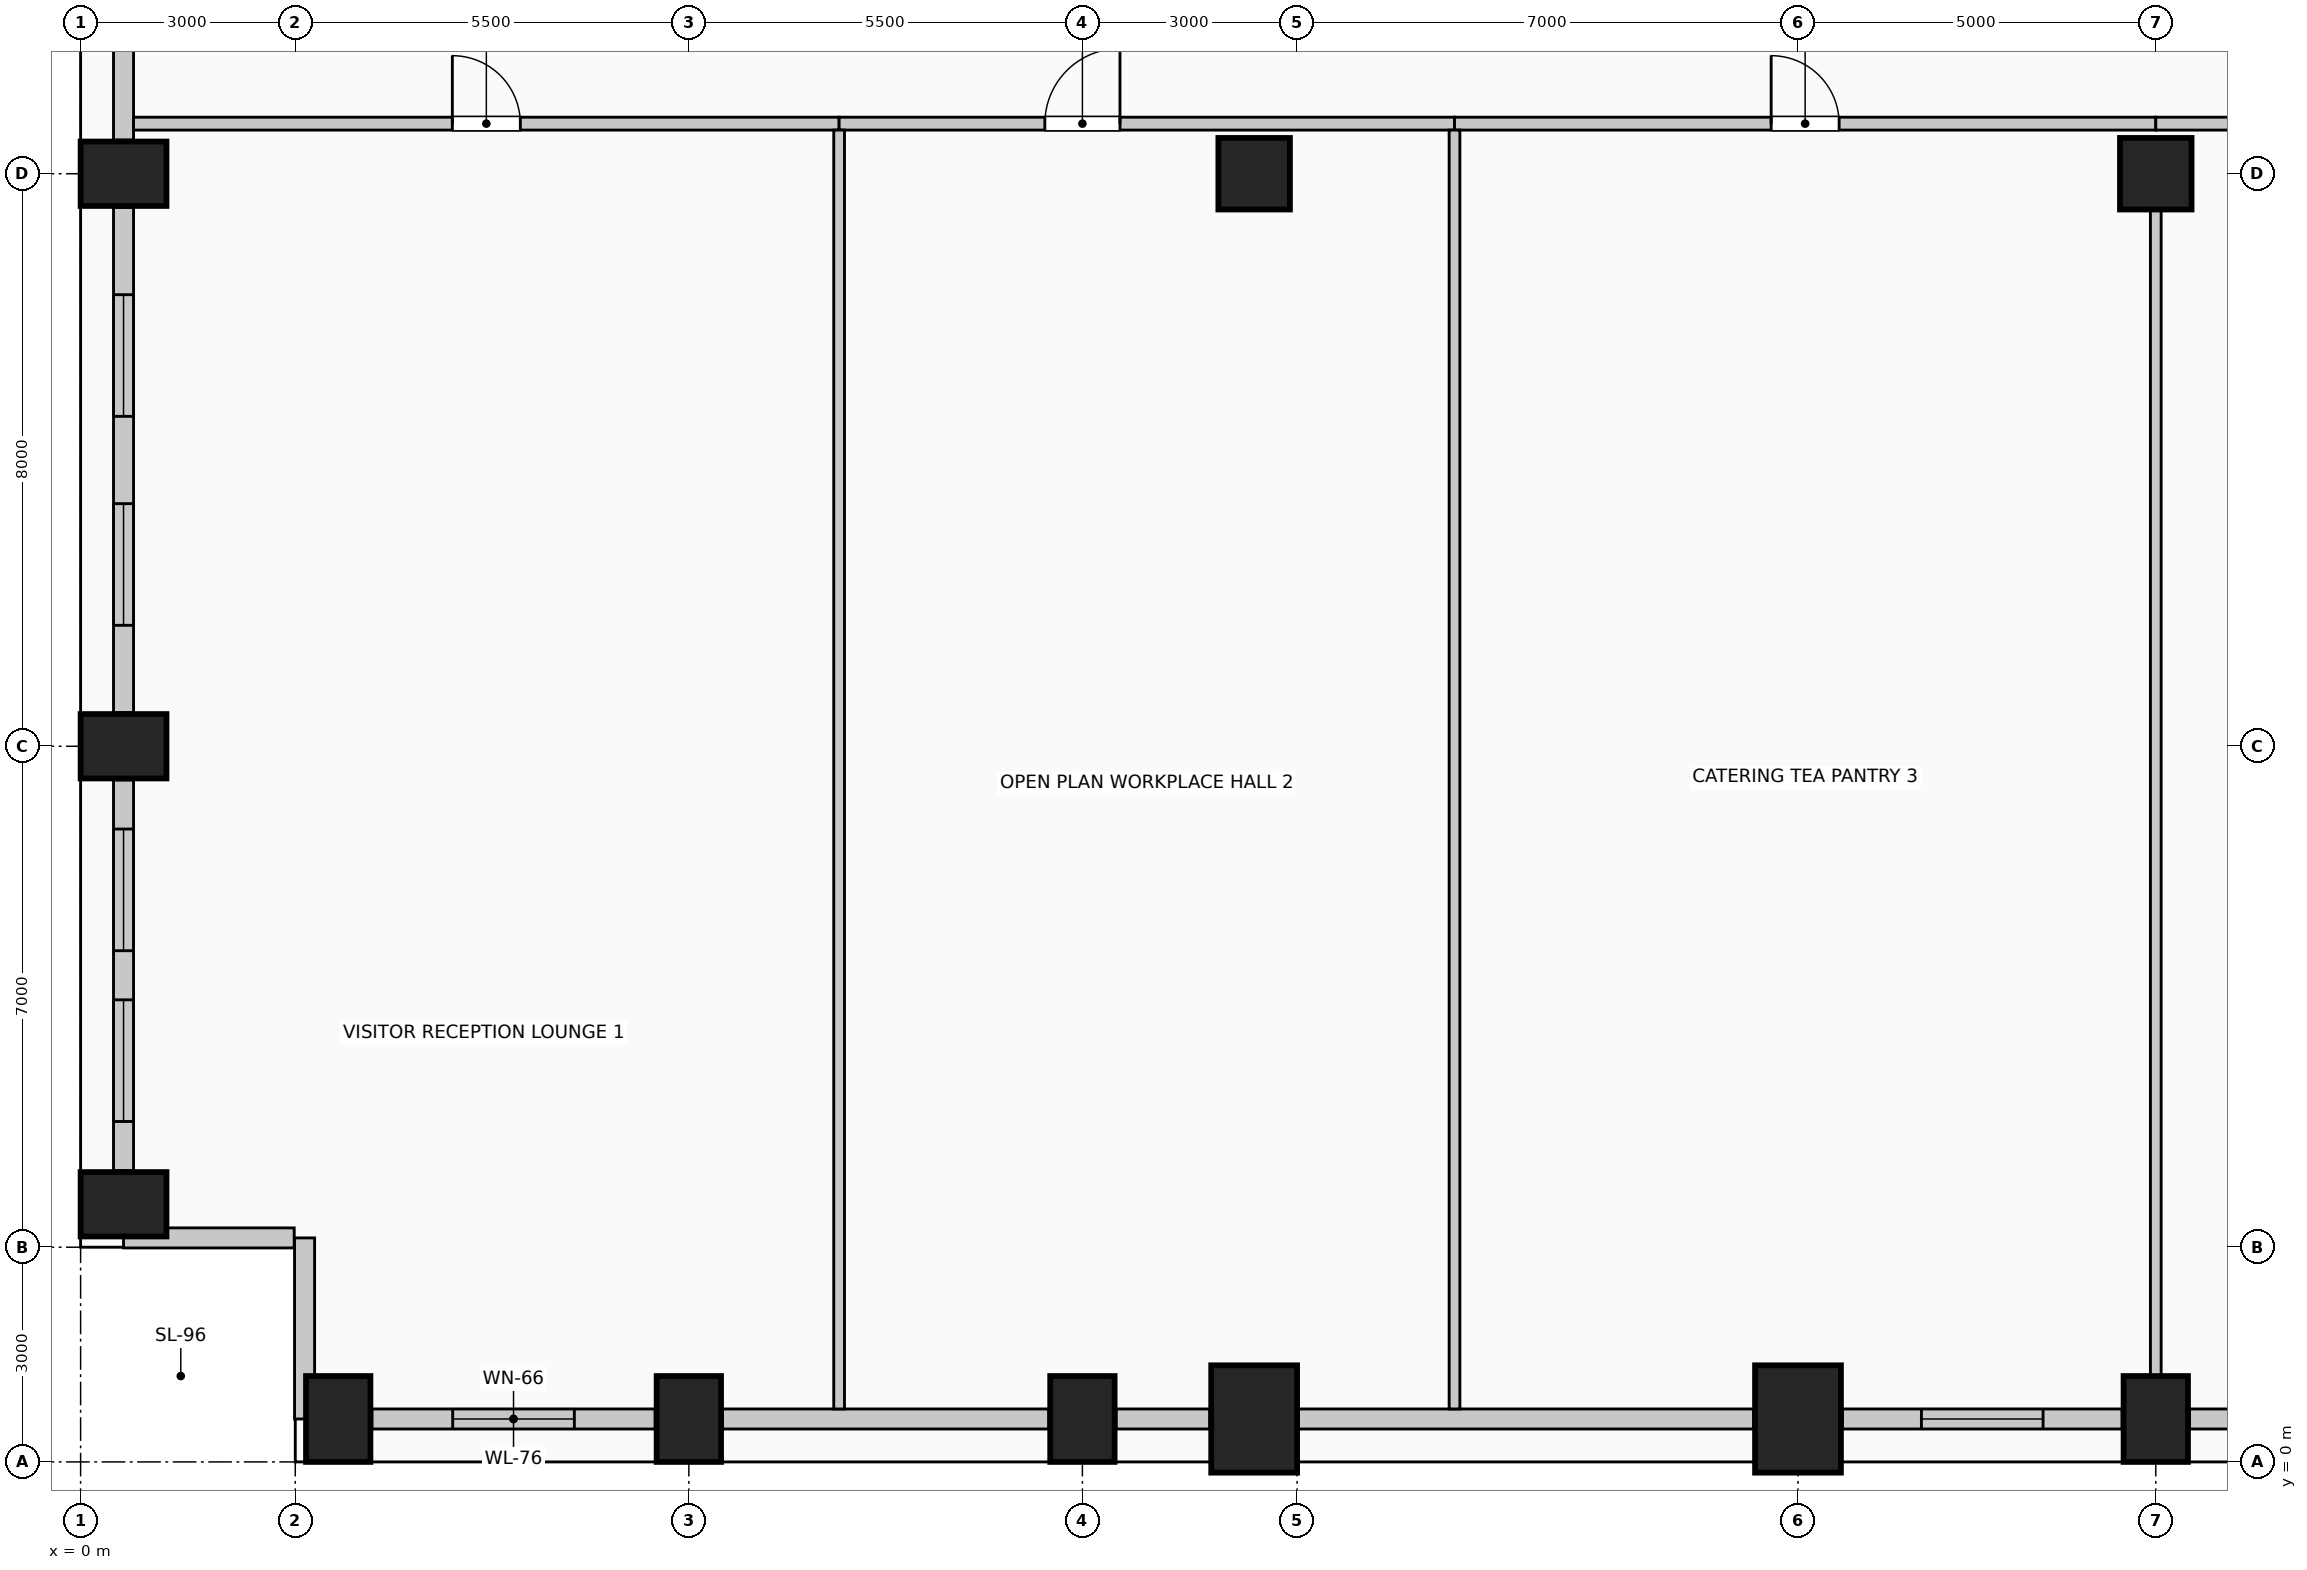
"""IFC4 building model, lengths in metres.
Left out: names, types, materials, properties, quantities, classifications, styles, units other than length and angle.
Written with IfcOpenShell. Run it as: python <this file> out.ifc"""

import sys

from ifc_helpers import new_model, si_unit, direction, frame, frame_2d, origin, origin_2d, place, context, subcontext, project, spatial, rectangle, circle, extrude, element, fill, save


model = new_model("IFC4")
c1 = context("Model", 3, precision=1e-05, world=origin(), true_north=direction((0.0, 1.0)))
c2 = subcontext(c1, "Body", "Model", "MODEL_VIEW")
j1 = project(units=[si_unit("LENGTHUNIT", "METRE"), si_unit("PLANEANGLEUNIT", "RADIAN")], contexts=[c1])
p1 = place(None, origin())
s1 = spatial("IfcSite", under=j1, at=p1, CompositionType="ELEMENT")
p2 = place(p1, origin())
s2 = spatial("IfcBuilding", under=s1, at=p2, CompositionType="ELEMENT")
p3 = place(p2, frame((0.0, 0.0, 78.6)))
s3 = spatial("IfcBuildingStorey", under=s2, at=p3, CompositionType="ELEMENT", Elevation=78.6)
for number, where, z_axis, x_axis in (
    (1, (3.6, 0.6, 0.0), (0.0, 0.0, 1.0), (1.0, 0.0, 0.0)),
    (2, (8.5, 0.6, 0.0), (0.0, 0.0, 1.0), (1.0, 0.0, 0.0)),
    (3, (14.0, 0.6, 0.0), (0.0, 0.0, 1.0), (1.0, 0.0, 0.0)),
):
    element("IfcColumn", number, at=place(p3, frame(where, z_axis=z_axis, x_axis=x_axis)), inside=s3, PredefinedType="COLUMN", context=c2, shape_type="SweptSolid", body=[
        extrude(rectangle(XDim=0.9, YDim=1.2, at=origin_2d()), origin(), (0.0, 0.0, 1.0), 4.0),
    ])
for number, where, z_axis, x_axis in (
    (4, (16.4, 0.6, 0.0), (0.0, 0.0, 1.0), (1.0, 0.0, 0.0)),
    (5, (24.0, 0.6, 0.0), (0.0, 0.0, 1.0), (1.0, 0.0, 0.0)),
):
    element("IfcColumn", number, at=place(p3, frame(where, z_axis=z_axis, x_axis=x_axis)), inside=s3, PredefinedType="COLUMN", context=c2, shape_type="SweptSolid", body=[
        extrude(rectangle(XDim=1.2, YDim=1.5, at=origin_2d()), origin(), (0.0, 0.0, 1.0), 4.0),
    ])
for number, where, z_axis, x_axis in (
    (6, (29.0, 0.6, 0.0), (0.0, 0.0, 1.0), (1.0, 0.0, 0.0)),
    (7, (0.6, 3.6, 0.0), (0.0, 0.0, 1.0), (0.0, 1.0, 0.0)),
    (8, (0.6, 10.0, 0.0), (0.0, 0.0, 1.0), (0.0, 1.0, 0.0)),
    (9, (0.6, 18.0, 0.0), (0.0, 0.0, 1.0), (0.0, 1.0, 0.0)),
):
    element("IfcColumn", number, at=place(p3, frame(where, z_axis=z_axis, x_axis=x_axis)), inside=s3, PredefinedType="COLUMN", context=c2, shape_type="SweptSolid", body=[
        extrude(rectangle(XDim=0.9, YDim=1.2, at=origin_2d()), origin(), (0.0, 0.0, 1.0), 4.0),
    ])
for number, where, z_axis, x_axis in (
    (10, (16.4, 18.0, 0.0), (0.0, 0.0, 1.0), (1.0, 0.0, 0.0)),
    (11, (29.0, 18.0, 0.0), (0.0, 0.0, 1.0), (1.0, 0.0, 0.0)),
):
    element("IfcColumn", number, at=place(p3, frame(where, z_axis=z_axis, x_axis=x_axis)), inside=s3, PredefinedType="COLUMN", context=c2, shape_type="SweptSolid", body=[
        extrude(circle(Radius=0.5, at=origin_2d()), origin(), (0.0, 0.0, 1.0), 4.0),
    ])
p4 = place(p3, frame((8.03, 0.6, 0.0), z_axis=(0.0, 0.0, 1.0), x_axis=(-1.0, 0.0, 0.0)))
e12 = element("IfcWall", 12, at=p4, inside=s3, PredefinedType="SOLIDWALL", context=c2, shape_type="SweptSolid", body=[
    extrude(rectangle(XDim=3.96, YDim=0.28, at=frame_2d((1.98, 0.0))), origin(), (0.0, 0.0, 1.0), 2.81),
])
p5 = place(p4, frame((1.13, 0.0, 0.5)))
e13 = element("IfcOpeningElement", 13, at=p5, cuts=e12, PredefinedType="OPENING", context=c2, shape_type="SweptSolid", body=[
    extrude(rectangle(XDim=1.7, YDim=1.95, at=frame_2d((0.85, 0.975))), frame((0.0, 0.15, 0.0), z_axis=(0.0, -1.0, 0.0), x_axis=(1.0, 0.0, 0.0)), (0.0, 0.0, 1.0), 0.3),
])
p6 = place(p3, frame((13.53, 0.6, 0.0), z_axis=(0.0, 0.0, 1.0), x_axis=(-1.0, 0.0, 0.0)))
e14 = element("IfcWall", 14, at=p6, inside=s3, PredefinedType="SOLIDWALL", context=c2, shape_type="SweptSolid", body=[
    extrude(rectangle(XDim=4.56, YDim=0.28, at=frame_2d((2.28, 0.0))), origin(), (0.0, 0.0, 1.0), 2.81),
])
p7 = place(p3, frame((15.78, 0.6, 0.0), z_axis=(0.0, 0.0, 1.0), x_axis=(-1.0, 0.0, 0.0)))
e15 = element("IfcWall", 15, at=p7, inside=s3, PredefinedType="SOLIDWALL", context=c2, shape_type="SweptSolid", body=[
    extrude(rectangle(XDim=1.31, YDim=0.28, at=frame_2d((0.655, 0.0))), origin(), (0.0, 0.0, 1.0), 2.81),
])
p8 = place(p3, frame((23.38, 0.6, 0.0), z_axis=(0.0, 0.0, 1.0), x_axis=(-1.0, 0.0, 0.0)))
e16 = element("IfcWall", 16, at=p8, inside=s3, PredefinedType="SOLIDWALL", context=c2, shape_type="SweptSolid", body=[
    extrude(rectangle(XDim=6.36, YDim=0.28, at=frame_2d((3.18, 0.0))), origin(), (0.0, 0.0, 1.0), 2.81),
])
p9 = place(p3, frame((28.53, 0.6, 0.0), z_axis=(0.0, 0.0, 1.0), x_axis=(-1.0, 0.0, 0.0)))
e17 = element("IfcWall", 17, at=p9, inside=s3, PredefinedType="SOLIDWALL", context=c2, shape_type="SweptSolid", body=[
    extrude(rectangle(XDim=3.91, YDim=0.28, at=frame_2d((1.955, 0.0))), origin(), (0.0, 0.0, 1.0), 2.81),
])
p10 = place(p9, frame((1.105, 0.0, 0.5)))
e18 = element("IfcOpeningElement", 18, at=p10, cuts=e17, PredefinedType="OPENING", context=c2, shape_type="SweptSolid", body=[
    extrude(rectangle(XDim=1.7, YDim=1.95, at=frame_2d((0.85, 0.975))), frame((0.0, 0.15, 0.0), z_axis=(0.0, -1.0, 0.0), x_axis=(1.0, 0.0, 0.0)), (0.0, 0.0, 1.0), 0.3),
])
p11 = place(p3, frame((33.38, 0.6, 0.0), z_axis=(0.0, 0.0, 1.0), x_axis=(-1.0, 0.0, 0.0)))
e19 = element("IfcWall", 19, at=p11, inside=s3, PredefinedType="SOLIDWALL", context=c2, shape_type="SweptSolid", body=[
    extrude(rectangle(XDim=3.91, YDim=0.28, at=frame_2d((1.955, 0.0))), origin(), (0.0, 0.0, 1.0), 2.81),
])
p12 = place(p11, frame((1.105, 0.0, 0.5)))
e20 = element("IfcOpeningElement", 20, at=p12, cuts=e19, PredefinedType="OPENING", context=c2, shape_type="SweptSolid", body=[
    extrude(rectangle(XDim=1.7, YDim=1.95, at=frame_2d((0.85, 0.975))), frame((0.0, 0.15, 0.0), z_axis=(0.0, -1.0, 0.0), x_axis=(1.0, 0.0, 0.0)), (0.0, 0.0, 1.0), 0.3),
])
p13 = place(p3, frame((0.6, 4.07, 0.0), z_axis=(0.0, 0.0, 1.0), x_axis=(0.0, 1.0, 0.0)))
e21 = element("IfcWall", 21, at=p13, inside=s3, PredefinedType="SOLIDWALL", context=c2, shape_type="SweptSolid", body=[
    extrude(rectangle(XDim=5.46, YDim=0.28, at=frame_2d((2.73, 0.0))), origin(), (0.0, 0.0, 1.0), 2.81),
])
p14 = place(p13, frame((0.687, 0.0, 0.5)))
e22 = element("IfcOpeningElement", 22, at=p14, cuts=e21, PredefinedType="OPENING", context=c2, shape_type="SweptSolid", body=[
    extrude(rectangle(XDim=1.7, YDim=1.95, at=frame_2d((0.85, 0.975))), frame((0.0, 0.15, 0.0), z_axis=(0.0, -1.0, 0.0), x_axis=(1.0, 0.0, 0.0)), (0.0, 0.0, 1.0), 0.3),
])
p15 = place(p13, frame((3.073, 0.0, 0.5)))
e23 = element("IfcOpeningElement", 23, at=p15, cuts=e21, PredefinedType="OPENING", context=c2, shape_type="SweptSolid", body=[
    extrude(rectangle(XDim=1.7, YDim=1.95, at=frame_2d((0.85, 0.975))), frame((0.0, 0.15, 0.0), z_axis=(0.0, -1.0, 0.0), x_axis=(1.0, 0.0, 0.0)), (0.0, 0.0, 1.0), 0.3),
])
p16 = place(p3, frame((0.6, 10.47, 0.0), z_axis=(0.0, 0.0, 1.0), x_axis=(0.0, 1.0, 0.0)))
e24 = element("IfcWall", 24, at=p16, inside=s3, PredefinedType="SOLIDWALL", context=c2, shape_type="SweptSolid", body=[
    extrude(rectangle(XDim=7.06, YDim=0.28, at=frame_2d((3.53, 0.0))), origin(), (0.0, 0.0, 1.0), 2.81),
])
p17 = place(p16, frame((1.22, 0.0, 0.5)))
e25 = element("IfcOpeningElement", 25, at=p17, cuts=e24, PredefinedType="OPENING", context=c2, shape_type="SweptSolid", body=[
    extrude(rectangle(XDim=1.7, YDim=1.95, at=frame_2d((0.85, 0.975))), frame((0.0, 0.15, 0.0), z_axis=(0.0, -1.0, 0.0), x_axis=(1.0, 0.0, 0.0)), (0.0, 0.0, 1.0), 0.3),
])
p18 = place(p16, frame((4.14, 0.0, 0.5)))
e26 = element("IfcOpeningElement", 26, at=p18, cuts=e24, PredefinedType="OPENING", context=c2, shape_type="SweptSolid", body=[
    extrude(rectangle(XDim=1.7, YDim=1.95, at=frame_2d((0.85, 0.975))), frame((0.0, 0.15, 0.0), z_axis=(0.0, -1.0, 0.0), x_axis=(1.0, 0.0, 0.0)), (0.0, 0.0, 1.0), 0.3),
])
p19 = place(p3, frame((0.6, 18.47, 0.0), z_axis=(0.0, 0.0, 1.0), x_axis=(0.0, 1.0, 0.0)))
e27 = element("IfcWall", 27, at=p19, inside=s3, PredefinedType="SOLIDWALL", context=c2, shape_type="SweptSolid", body=[
    extrude(rectangle(XDim=7.06, YDim=0.28, at=frame_2d((3.53, 0.0))), origin(), (0.0, 0.0, 1.0), 2.81),
])
p20 = place(p3, frame((3.13, 0.6, 0.0), z_axis=(0.0, 0.0, 1.0), x_axis=(0.0, 1.0, 0.0)))
e28 = element("IfcWall", 28, at=p20, inside=s3, PredefinedType="SOLIDWALL", context=c2, shape_type="SweptSolid", body=[
    extrude(rectangle(XDim=2.53, YDim=0.28, at=frame_2d((1.265, 0.0))), origin(), (0.0, 0.0, 1.0), 3.66),
])
p21 = place(p3, frame((2.985, 3.13, 0.0), z_axis=(0.0, 0.0, 1.0), x_axis=(-1.0, 0.0, 0.0)))
e29 = element("IfcWall", 29, at=p21, inside=s3, PredefinedType="SOLIDWALL", context=c2, shape_type="SweptSolid", body=[
    extrude(rectangle(XDim=2.385, YDim=0.28, at=frame_2d((1.192, 0.0))), origin(), (0.0, 0.0, 1.0), 3.66),
])
p22 = place(p3, frame((0.74, 18.7, 0.0), z_axis=(0.0, 0.0, 1.0), x_axis=(1.0, 0.0, 0.0)))
e30 = element("IfcWall", 30, at=p22, inside=s3, PredefinedType="PARTITIONING", context=c2, shape_type="SweptSolid", body=[
    extrude(rectangle(XDim=9.86, YDim=0.18, at=frame_2d((4.93, 0.0))), origin(), (0.0, 0.0, 1.0), 3.66),
])
p23 = place(p22, frame((4.455, 0.0, 0.0)))
e31 = element("IfcOpeningElement", 31, at=p23, cuts=e30, PredefinedType="OPENING", context=c2, shape_type="SweptSolid", body=[
    extrude(rectangle(XDim=0.95, YDim=2.15, at=frame_2d((0.475, 1.075))), frame((0.0, 0.1, 0.0), z_axis=(0.0, -1.0, 0.0), x_axis=(1.0, 0.0, 0.0)), (0.0, 0.0, 1.0), 0.2),
])
p24 = place(p3, frame((10.6, 18.7, 0.0), z_axis=(0.0, 0.0, 1.0), x_axis=(1.0, 0.0, 0.0)))
e32 = element("IfcWall", 32, at=p24, inside=s3, PredefinedType="PARTITIONING", context=c2, shape_type="SweptSolid", body=[
    extrude(rectangle(XDim=8.6, YDim=0.18, at=frame_2d((4.3, 0.0))), origin(), (0.0, 0.0, 1.0), 3.66),
])
p25 = place(p24, frame((2.875, 0.0, 0.0)))
e33 = element("IfcOpeningElement", 33, at=p25, cuts=e32, PredefinedType="OPENING", context=c2, shape_type="SweptSolid", body=[
    extrude(rectangle(XDim=1.05, YDim=2.15, at=frame_2d((0.525, 1.075))), frame((0.0, 0.1, 0.0), z_axis=(0.0, -1.0, 0.0), x_axis=(1.0, 0.0, 0.0)), (0.0, 0.0, 1.0), 0.2),
])
p26 = place(p3, frame((19.2, 18.7, 0.0), z_axis=(0.0, 0.0, 1.0), x_axis=(1.0, 0.0, 0.0)))
e34 = element("IfcWall", 34, at=p26, inside=s3, PredefinedType="PARTITIONING", context=c2, shape_type="SweptSolid", body=[
    extrude(rectangle(XDim=9.8, YDim=0.18, at=frame_2d((4.9, 0.0))), origin(), (0.0, 0.0, 1.0), 3.66),
])
p27 = place(p26, frame((4.425, 0.0, 0.0)))
e35 = element("IfcOpeningElement", 35, at=p27, cuts=e34, PredefinedType="OPENING", context=c2, shape_type="SweptSolid", body=[
    extrude(rectangle(XDim=0.95, YDim=2.15, at=frame_2d((0.475, 1.075))), frame((0.0, 0.1, 0.0), z_axis=(0.0, -1.0, 0.0), x_axis=(1.0, 0.0, 0.0)), (0.0, 0.0, 1.0), 0.2),
])
p28 = place(p3, frame((29.0, 18.7, 0.0), z_axis=(0.0, 0.0, 1.0), x_axis=(1.0, 0.0, 0.0)))
e36 = element("IfcWall", 36, at=p28, inside=s3, PredefinedType="PARTITIONING", context=c2, shape_type="SweptSolid", body=[
    extrude(rectangle(XDim=10.4, YDim=0.18, at=frame_2d((5.2, 0.0))), origin(), (0.0, 0.0, 1.0), 3.66),
])
p29 = place(p28, frame((4.675, 0.0, 0.0)))
e37 = element("IfcOpeningElement", 37, at=p29, cuts=e36, PredefinedType="OPENING", context=c2, shape_type="SweptSolid", body=[
    extrude(rectangle(XDim=1.05, YDim=2.15, at=frame_2d((0.525, 1.075))), frame((0.0, 0.1, 0.0), z_axis=(0.0, -1.0, 0.0), x_axis=(1.0, 0.0, 0.0)), (0.0, 0.0, 1.0), 0.2),
])
for number, where, z_axis, x_axis in (
    (38, (10.6, 0.74, 0.0), (0.0, 0.0, 1.0), (0.0, 1.0, 0.0)),
    (39, (19.2, 0.74, 0.0), (0.0, 0.0, 1.0), (0.0, 1.0, 0.0)),
):
    element("IfcWall", number, at=place(p3, frame(where, z_axis=z_axis, x_axis=x_axis)), inside=s3, PredefinedType="PARTITIONING", context=c2, shape_type="SweptSolid", body=[
        extrude(rectangle(XDim=17.87, YDim=0.15, at=frame_2d((8.935, 0.0))), origin(), (0.0, 0.0, 1.0), 3.66),
    ])
p30 = place(p3, frame((29.0, 1.2, 0.0), z_axis=(0.0, 0.0, 1.0), x_axis=(0.0, 1.0, 0.0)))
e40 = element("IfcWall", 40, at=p30, inside=s3, PredefinedType="PARTITIONING", context=c2, shape_type="SweptSolid", body=[
    extrude(rectangle(XDim=16.3, YDim=0.15, at=frame_2d((8.15, 0.0))), origin(), (0.0, 0.0, 1.0), 2.955),
])
p31 = place(p5, origin())
e41 = element("IfcWindow", 41, at=p31, inside=s3, PartitioningType="SINGLE_PANEL", PredefinedType="WINDOW", context=c2, shape_type="SweptSolid", body=[
    extrude(rectangle(XDim=1.7, YDim=1.95, at=frame_2d((0.85, 0.975))), frame((0.0, 0.03, 0.0), z_axis=(0.0, -1.0, 0.0), x_axis=(1.0, 0.0, 0.0)), (0.0, 0.0, 1.0), 0.06),
])
fill(e13, e41)
p32 = place(p10, origin())
e42 = element("IfcWindow", 42, at=p32, inside=s3, PartitioningType="SINGLE_PANEL", PredefinedType="WINDOW", context=c2, shape_type="SweptSolid", body=[
    extrude(rectangle(XDim=1.7, YDim=1.95, at=frame_2d((0.85, 0.975))), frame((0.0, 0.03, 0.0), z_axis=(0.0, -1.0, 0.0), x_axis=(1.0, 0.0, 0.0)), (0.0, 0.0, 1.0), 0.06),
])
fill(e18, e42)
p33 = place(p14, origin())
e43 = element("IfcWindow", 43, at=p33, inside=s3, PartitioningType="SINGLE_PANEL", PredefinedType="WINDOW", context=c2, shape_type="SweptSolid", body=[
    extrude(rectangle(XDim=1.7, YDim=1.95, at=frame_2d((0.85, 0.975))), frame((0.0, 0.03, 0.0), z_axis=(0.0, -1.0, 0.0), x_axis=(1.0, 0.0, 0.0)), (0.0, 0.0, 1.0), 0.06),
])
fill(e22, e43)
p34 = place(p15, origin())
e44 = element("IfcWindow", 44, at=p34, inside=s3, PartitioningType="SINGLE_PANEL", PredefinedType="WINDOW", context=c2, shape_type="SweptSolid", body=[
    extrude(rectangle(XDim=1.7, YDim=1.95, at=frame_2d((0.85, 0.975))), frame((0.0, 0.03, 0.0), z_axis=(0.0, -1.0, 0.0), x_axis=(1.0, 0.0, 0.0)), (0.0, 0.0, 1.0), 0.06),
])
fill(e23, e44)
p35 = place(p17, origin())
e45 = element("IfcWindow", 45, at=p35, inside=s3, PartitioningType="SINGLE_PANEL", PredefinedType="WINDOW", context=c2, shape_type="SweptSolid", body=[
    extrude(rectangle(XDim=1.7, YDim=1.95, at=frame_2d((0.85, 0.975))), frame((0.0, 0.03, 0.0), z_axis=(0.0, -1.0, 0.0), x_axis=(1.0, 0.0, 0.0)), (0.0, 0.0, 1.0), 0.06),
])
fill(e25, e45)
p36 = place(p18, origin())
e46 = element("IfcWindow", 46, at=p36, inside=s3, PartitioningType="SINGLE_PANEL", PredefinedType="WINDOW", context=c2, shape_type="SweptSolid", body=[
    extrude(rectangle(XDim=1.7, YDim=1.95, at=frame_2d((0.85, 0.975))), frame((0.0, 0.03, 0.0), z_axis=(0.0, -1.0, 0.0), x_axis=(1.0, 0.0, 0.0)), (0.0, 0.0, 1.0), 0.06),
])
fill(e26, e46)
p37 = place(p23, origin())
e47 = element("IfcDoor", 47, at=p37, inside=s3, OperationType="SINGLE_SWING_LEFT", PredefinedType="DOOR", context=c2, shape_type="SweptSolid", body=[
    extrude(rectangle(XDim=0.95, YDim=2.15, at=frame_2d((0.475, 1.075))), frame((0.0, 0.025, 0.0), z_axis=(0.0, -1.0, 0.0), x_axis=(1.0, 0.0, 0.0)), (0.0, 0.0, 1.0), 0.05),
])
fill(e31, e47)
p38 = place(p25, origin())
e48 = element("IfcDoor", 48, at=p38, inside=s3, OperationType="SINGLE_SWING_RIGHT", PredefinedType="DOOR", context=c2, shape_type="SweptSolid", body=[
    extrude(rectangle(XDim=1.05, YDim=2.15, at=frame_2d((0.525, 1.075))), frame((0.0, 0.025, 0.0), z_axis=(0.0, -1.0, 0.0), x_axis=(1.0, 0.0, 0.0)), (0.0, 0.0, 1.0), 0.05),
])
fill(e33, e48)
p39 = place(p27, origin())
e49 = element("IfcDoor", 49, at=p39, inside=s3, OperationType="SINGLE_SWING_LEFT", PredefinedType="DOOR", context=c2, shape_type="SweptSolid", body=[
    extrude(rectangle(XDim=0.95, YDim=2.15, at=frame_2d((0.475, 1.075))), frame((0.0, 0.025, 0.0), z_axis=(0.0, -1.0, 0.0), x_axis=(1.0, 0.0, 0.0)), (0.0, 0.0, 1.0), 0.05),
])
fill(e35, e49)
save(model, sys.argv[1])
